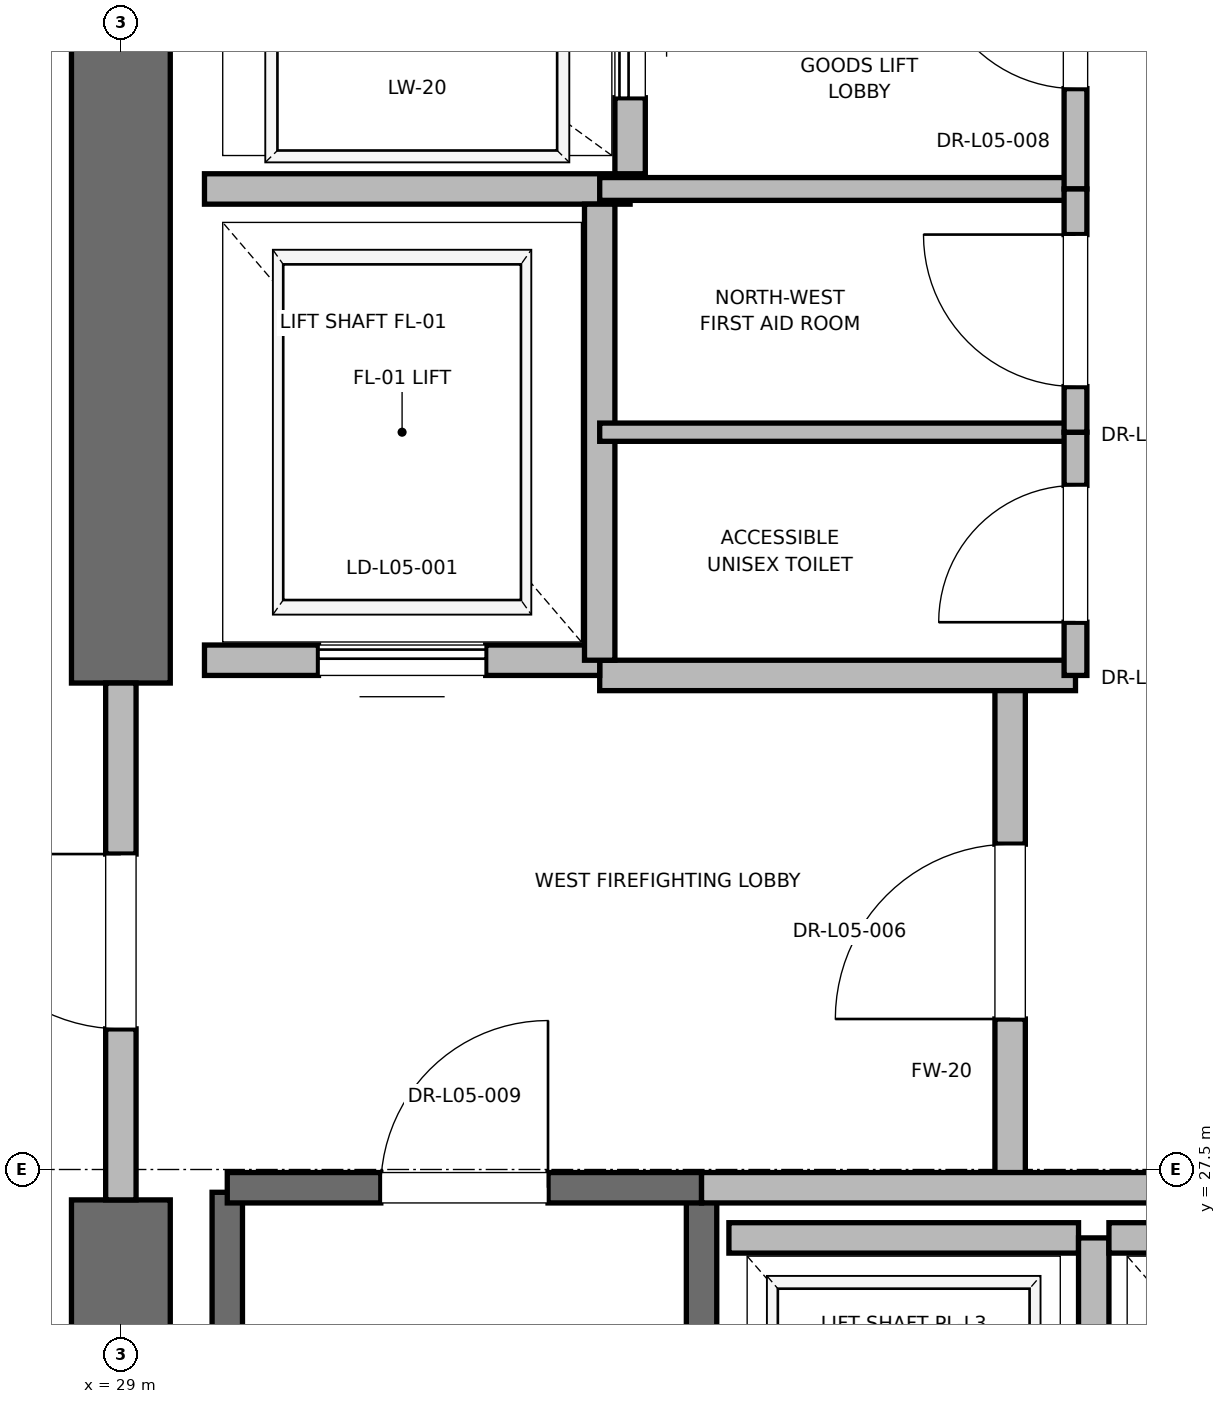
"""IFC4 building model, lengths in metres.
Left out: names, types, materials, properties, quantities, classifications, styles, units other than length and angle.
Written with IfcOpenShell. Run it as: python <this file> out.ifc"""

import sys

from ifc_helpers import new_model, si_unit, direction, frame, frame_2d, origin, place, context, subcontext, project, spatial, rectangle, extrude, element, fill, save


model = new_model("IFC4")
c1 = context("Model", 3, precision=1e-05, world=origin(), true_north=direction((0.0, 1.0)))
c2 = subcontext(c1, "Body", "Model", "MODEL_VIEW")
j1 = project(units=[si_unit("LENGTHUNIT", "METRE"), si_unit("PLANEANGLEUNIT", "RADIAN")], contexts=[c1])
p1 = place(None, origin())
s1 = spatial("IfcSite", under=j1, at=p1, CompositionType="ELEMENT")
p2 = place(p1, origin())
s2 = spatial("IfcBuilding", under=s1, at=p2, CompositionType="ELEMENT")
p3 = place(p2, frame((0.0, 0.0, 27.6)))
s3 = spatial("IfcBuildingStorey", under=s2, at=p3, CompositionType="ELEMENT", Elevation=27.6)
p4 = place(p3, frame((29.0, 18.5, 0.0), z_axis=(0.0, 0.0, 1.0), x_axis=(0.0, 1.0, 0.0)))
e1 = element("IfcWall", 1, at=p4, inside=s3, PredefinedType="SHEAR", context=c2, shape_type="SweptSolid", body=[
    extrude(rectangle(XDim=8.8, YDim=0.65, at=frame_2d((4.4, 0.0))), origin(), (0.0, 0.0, 1.0), 3.76),
])
p5 = place(p3, frame((29.0, 30.7, 0.0), z_axis=(0.0, 0.0, 1.0), x_axis=(0.0, 1.0, 0.0)))
e2 = element("IfcWall", 2, at=p5, inside=s3, PredefinedType="SHEAR", context=c2, shape_type="SweptSolid", body=[
    extrude(rectangle(XDim=5.8, YDim=0.65, at=frame_2d((2.9, 0.0))), origin(), (0.0, 0.0, 1.0), 3.76),
])
p6 = place(p3, frame((29.7, 19.2, 0.0), z_axis=(0.0, 0.0, 1.0), x_axis=(0.0, 1.0, 0.0)))
e3 = element("IfcWall", 3, at=p6, inside=s3, PredefinedType="SOLIDWALL", context=c2, shape_type="SweptSolid", body=[
    extrude(rectangle(XDim=8.15, YDim=0.2, at=frame_2d((4.075, 0.0))), origin(), (0.0, 0.0, 1.0), 3.76),
])
p7 = place(p3, frame((32.82, 18.6, 0.0), z_axis=(0.0, 0.0, 1.0), x_axis=(0.0, 1.0, 0.0)))
e4 = element("IfcWall", 4, at=p7, inside=s3, PredefinedType="SOLIDWALL", context=c2, shape_type="SweptSolid", body=[
    extrude(rectangle(XDim=8.78, YDim=0.2, at=frame_2d((4.39, 0.0))), origin(), (0.0, 0.0, 1.0), 3.76),
])
p8 = place(p3, frame((29.7, 27.38, 0.0), z_axis=(0.0, 0.0, 1.0), x_axis=(1.0, 0.0, 0.0)))
e5 = element("IfcWall", 5, at=p8, inside=s3, PredefinedType="SOLIDWALL", context=c2, shape_type="SweptSolid", body=[
    extrude(rectangle(XDim=3.12, YDim=0.2, at=frame_2d((1.56, 0.0))), origin(), (0.0, 0.0, 1.0), 3.76),
])
p9 = place(p8, frame((1.01, 0.0, 0.0)))
e6 = element("IfcOpeningElement", 6, at=p9, cuts=e5, PredefinedType="OPENING", context=c2, shape_type="SweptSolid", body=[
    extrude(rectangle(XDim=1.1, YDim=2.15, at=frame_2d((0.55, 1.075))), frame((0.0, 0.1, 0.0), z_axis=(0.0, -1.0, 0.0), x_axis=(1.0, 0.0, 0.0)), (0.0, 0.0, 1.0), 0.2),
])
p10 = place(p3, frame((34.85, 27.38, 0.0), z_axis=(0.0, 0.0, 1.0), x_axis=(0.0, 1.0, 0.0)))
e7 = element("IfcWall", 7, at=p10, inside=s3, PredefinedType="PARTITIONING", context=c2, shape_type="SweptSolid", body=[
    extrude(rectangle(XDim=3.37, YDim=0.2, at=frame_2d((1.685, 0.0))), origin(), (0.0, 0.0, 1.0), 3.76),
])
p11 = place(p10, frame((1.11, 0.0, 0.0)))
e8 = element("IfcOpeningElement", 8, at=p11, cuts=e7, PredefinedType="OPENING", context=c2, shape_type="SweptSolid", body=[
    extrude(rectangle(XDim=1.15, YDim=2.2, at=frame_2d((0.575, 1.1))), frame((0.0, 0.1, 0.0), z_axis=(0.0, -1.0, 0.0), x_axis=(1.0, 0.0, 0.0)), (0.0, 0.0, 1.0), 0.2),
])
p12 = place(p3, frame((29.0, 27.3, 0.0), z_axis=(0.0, 0.0, 1.0), x_axis=(0.0, 1.0, 0.0)))
e9 = element("IfcWall", 9, at=p12, inside=s3, PredefinedType="PARTITIONING", context=c2, shape_type="SweptSolid", body=[
    extrude(rectangle(XDim=3.4, YDim=0.2, at=frame_2d((1.7, 0.0))), origin(), (0.0, 0.0, 1.0), 2.54),
])
p13 = place(p12, frame((1.125, 0.0, 0.0)))
e10 = element("IfcOpeningElement", 10, at=p13, cuts=e9, PredefinedType="OPENING", context=c2, shape_type="SweptSolid", body=[
    extrude(rectangle(XDim=1.15, YDim=2.2, at=frame_2d((0.575, 1.1))), frame((0.0, 0.1, 0.0), z_axis=(0.0, -1.0, 0.0), x_axis=(1.0, 0.0, 0.0)), (0.0, 0.0, 1.0), 0.2),
])
p14 = place(p3, frame((32.82, 27.38, 0.0), z_axis=(0.0, 0.0, 1.0), x_axis=(1.0, 0.0, 0.0)))
e11 = element("IfcWall", 11, at=p14, inside=s3, PredefinedType="PARTITIONING", context=c2, shape_type="SweptSolid", body=[
    extrude(rectangle(XDim=5.62, YDim=0.2, at=frame_2d((2.81, 0.0))), origin(), (0.0, 0.0, 1.0), 3.76),
])
p15 = place(p3, frame((32.15, 30.75, 0.0), z_axis=(0.0, 0.0, 1.0), x_axis=(1.0, 0.0, 0.0)))
e12 = element("IfcWall", 12, at=p15, inside=s3, PredefinedType="PARTITIONING", context=c2, shape_type="SweptSolid", body=[
    extrude(rectangle(XDim=3.13, YDim=0.2, at=frame_2d((1.565, 0.0))), origin(), (0.0, 0.0, 1.0), 3.76),
])
p16 = place(p3, frame((29.55, 30.85, 0.0), z_axis=(0.0, 0.0, 1.0), x_axis=(1.0, 0.0, 0.0)))
e13 = element("IfcWall", 13, at=p16, inside=s3, PredefinedType="SOLIDWALL", context=c2, shape_type="SweptSolid", body=[
    extrude(rectangle(XDim=2.6, YDim=0.2, at=frame_2d((1.3, 0.0))), origin(), (0.0, 0.0, 1.0), 2.54),
])
p17 = place(p16, frame((0.75, 0.0, 0.0)))
e14 = element("IfcOpeningElement", 14, at=p17, cuts=e13, PredefinedType="OPENING", context=c2, shape_type="SweptSolid", body=[
    extrude(rectangle(XDim=1.1, YDim=2.2, at=frame_2d((0.55, 1.1))), frame((0.0, 0.1, 0.0), z_axis=(0.0, -1.0, 0.0), x_axis=(1.0, 0.0, 0.0)), (0.0, 0.0, 1.0), 0.2),
])
p18 = place(p3, frame((29.55, 33.95, 0.0), z_axis=(0.0, 0.0, 1.0), x_axis=(1.0, 0.0, 0.0)))
e15 = element("IfcWall", 15, at=p18, inside=s3, PredefinedType="SOLIDWALL", context=c2, shape_type="SweptSolid", body=[
    extrude(rectangle(XDim=2.8, YDim=0.2, at=frame_2d((1.4, 0.0))), origin(), (0.0, 0.0, 1.0), 3.76),
])
p19 = place(p3, frame((32.15, 30.85, 0.0), z_axis=(0.0, 0.0, 1.0), x_axis=(0.0, 1.0, 0.0)))
e16 = element("IfcWall", 16, at=p19, inside=s3, PredefinedType="SOLIDWALL", context=c2, shape_type="SweptSolid", body=[
    extrude(rectangle(XDim=3.0, YDim=0.2, at=frame_2d((1.5, 0.0))), origin(), (0.0, 0.0, 1.0), 3.76),
])
p20 = place(p3, frame((32.35, 34.05, 0.0), z_axis=(0.0, 0.0, 1.0), x_axis=(0.0, 1.0, 0.0)))
e17 = element("IfcWall", 17, at=p20, inside=s3, PredefinedType="SOLIDWALL", context=c2, shape_type="SweptSolid", body=[
    extrude(rectangle(XDim=2.1, YDim=0.2, at=frame_2d((1.05, 0.0))), origin(), (0.0, 0.0, 1.0), 3.76),
])
p21 = place(p20, frame((0.5, 0.0, 0.0)))
e18 = element("IfcOpeningElement", 18, at=p21, cuts=e17, PredefinedType="OPENING", context=c2, shape_type="SweptSolid", body=[
    extrude(rectangle(XDim=1.1, YDim=2.2, at=frame_2d((0.55, 1.1))), frame((0.0, 0.1, 0.0), z_axis=(0.0, -1.0, 0.0), x_axis=(1.0, 0.0, 0.0)), (0.0, 0.0, 1.0), 0.2),
])
p22 = place(p3, frame((35.3, 27.05, 0.0), z_axis=(0.0, 0.0, 1.0), x_axis=(-1.0, 0.0, 0.0)))
e19 = element("IfcWall", 19, at=p22, inside=s3, PredefinedType="SOLIDWALL", context=c2, shape_type="SweptSolid", body=[
    extrude(rectangle(XDim=2.3, YDim=0.2, at=frame_2d((1.15, 0.0))), origin(), (0.0, 0.0, 1.0), 3.76),
])
p23 = place(p3, frame((35.4, 24.45, 0.0), z_axis=(0.0, 0.0, 1.0), x_axis=(0.0, 1.0, 0.0)))
e20 = element("IfcWall", 20, at=p23, inside=s3, PredefinedType="SOLIDWALL", context=c2, shape_type="SweptSolid", body=[
    extrude(rectangle(XDim=2.6, YDim=0.2, at=frame_2d((1.3, 0.0))), origin(), (0.0, 0.0, 1.0), 3.76),
])
p24 = place(p3, frame((37.8, 27.05, 0.0), z_axis=(0.0, 0.0, 1.0), x_axis=(-1.0, 0.0, 0.0)))
e21 = element("IfcWall", 21, at=p24, inside=s3, PredefinedType="SOLIDWALL", context=c2, shape_type="SweptSolid", body=[
    extrude(rectangle(XDim=2.3, YDim=0.2, at=frame_2d((1.15, 0.0))), origin(), (0.0, 0.0, 1.0), 3.76),
])
p25 = place(p3, frame((32.15, 33.95, 0.0), z_axis=(0.0, 0.0, 1.0), x_axis=(1.0, 0.0, 0.0)))
e22 = element("IfcWall", 22, at=p25, inside=s3, PredefinedType="PARTITIONING", context=c2, shape_type="SweptSolid", body=[
    extrude(rectangle(XDim=3.13, YDim=0.15, at=frame_2d((1.565, 0.0))), origin(), (0.0, 0.0, 1.0), 2.85),
])
p26 = place(p3, frame((35.28, 33.95, 0.0), z_axis=(0.0, 0.0, 1.0), x_axis=(0.0, 1.0, 0.0)))
e23 = element("IfcWall", 23, at=p26, inside=s3, PredefinedType="PARTITIONING", context=c2, shape_type="SweptSolid", body=[
    extrude(rectangle(XDim=2.27, YDim=0.15, at=frame_2d((1.135, 0.0))), origin(), (0.0, 0.0, 1.0), 2.54),
])
p27 = place(p26, frame((0.66, 0.0, 0.0)))
e24 = element("IfcOpeningElement", 24, at=p27, cuts=e23, PredefinedType="OPENING", context=c2, shape_type="SweptSolid", body=[
    extrude(rectangle(XDim=0.95, YDim=2.15, at=frame_2d((0.475, 1.075))), frame((0.0, 0.075, 0.0), z_axis=(0.0, -1.0, 0.0), x_axis=(1.0, 0.0, 0.0)), (0.0, 0.0, 1.0), 0.15),
])
p28 = place(p3, frame((32.15, 32.35, 0.0), z_axis=(0.0, 0.0, 1.0), x_axis=(1.0, 0.0, 0.0)))
e25 = element("IfcWall", 25, at=p28, inside=s3, PredefinedType="PARTITIONING", context=c2, shape_type="SweptSolid", body=[
    extrude(rectangle(XDim=3.13, YDim=0.12, at=frame_2d((1.565, 0.0))), origin(), (0.0, 0.0, 1.0), 2.85),
])
p29 = place(p3, frame((35.28, 30.75, 0.0), z_axis=(0.0, 0.0, 1.0), x_axis=(0.0, 1.0, 0.0)))
e26 = element("IfcWall", 26, at=p29, inside=s3, PredefinedType="PARTITIONING", context=c2, shape_type="SweptSolid", body=[
    extrude(rectangle(XDim=1.6, YDim=0.15, at=frame_2d((0.8, 0.0))), origin(), (0.0, 0.0, 1.0), 2.85),
])
p30 = place(p29, frame((0.35, 0.0, 0.0)))
e27 = element("IfcOpeningElement", 27, at=p30, cuts=e26, PredefinedType="OPENING", context=c2, shape_type="SweptSolid", body=[
    extrude(rectangle(XDim=0.9, YDim=2.1, at=frame_2d((0.45, 1.05))), frame((0.0, 0.075, 0.0), z_axis=(0.0, -1.0, 0.0), x_axis=(1.0, 0.0, 0.0)), (0.0, 0.0, 1.0), 0.15),
])
p31 = place(p3, frame((35.28, 32.35, 0.0), z_axis=(0.0, 0.0, 1.0), x_axis=(0.0, 1.0, 0.0)))
e28 = element("IfcWall", 28, at=p31, inside=s3, PredefinedType="PARTITIONING", context=c2, shape_type="SweptSolid", body=[
    extrude(rectangle(XDim=1.6, YDim=0.15, at=frame_2d((0.8, 0.0))), origin(), (0.0, 0.0, 1.0), 2.85),
])
p32 = place(p31, frame((0.3, 0.0, 0.0)))
e29 = element("IfcOpeningElement", 29, at=p32, cuts=e28, PredefinedType="OPENING", context=c2, shape_type="SweptSolid", body=[
    extrude(rectangle(XDim=1.0, YDim=2.15, at=frame_2d((0.5, 1.075))), frame((0.0, 0.075, 0.0), z_axis=(0.0, -1.0, 0.0), x_axis=(1.0, 0.0, 0.0)), (0.0, 0.0, 1.0), 0.15),
])
p33 = place(p9, origin())
e30 = element("IfcDoor", 30, at=p33, inside=s3, OperationType="SINGLE_SWING_RIGHT", PredefinedType="DOOR", context=c2, shape_type="SweptSolid", body=[
    extrude(rectangle(XDim=1.1, YDim=2.15, at=frame_2d((0.55, 1.075))), frame((0.0, 0.025, 0.0), z_axis=(0.0, -1.0, 0.0), x_axis=(1.0, 0.0, 0.0)), (0.0, 0.0, 1.0), 0.05),
])
fill(e6, e30)
p34 = place(p11, origin())
e31 = element("IfcDoor", 31, at=p34, inside=s3, OperationType="SINGLE_SWING_LEFT", PredefinedType="DOOR", context=c2, shape_type="SweptSolid", body=[
    extrude(rectangle(XDim=1.15, YDim=2.2, at=frame_2d((0.575, 1.1))), frame((0.0, 0.025, 0.0), z_axis=(0.0, -1.0, 0.0), x_axis=(1.0, 0.0, 0.0)), (0.0, 0.0, 1.0), 0.05),
])
fill(e8, e31)
p35 = place(p13, origin())
e32 = element("IfcDoor", 32, at=p35, inside=s3, OperationType="SINGLE_SWING_RIGHT", PredefinedType="DOOR", context=c2, shape_type="SweptSolid", body=[
    extrude(rectangle(XDim=1.15, YDim=2.2, at=frame_2d((0.575, 1.1))), frame((0.0, 0.025, 0.0), z_axis=(0.0, -1.0, 0.0), x_axis=(1.0, 0.0, 0.0)), (0.0, 0.0, 1.0), 0.05),
])
fill(e10, e32)
p36 = place(p17, origin())
e33 = element("IfcDoor", 33, at=p36, inside=s3, OperationType="SLIDING_TO_RIGHT", PredefinedType="DOOR", context=c2, shape_type="SweptSolid", body=[
    extrude(rectangle(XDim=1.1, YDim=2.2, at=frame_2d((0.55, 1.1))), frame((0.0, 0.025, 0.0), z_axis=(0.0, -1.0, 0.0), x_axis=(1.0, 0.0, 0.0)), (0.0, 0.0, 1.0), 0.05),
])
fill(e14, e33)
p37 = place(p21, origin())
e34 = element("IfcDoor", 34, at=p37, inside=s3, OperationType="SLIDING_TO_RIGHT", PredefinedType="DOOR", context=c2, shape_type="SweptSolid", body=[
    extrude(rectangle(XDim=1.1, YDim=2.2, at=frame_2d((0.55, 1.1))), frame((0.0, 0.025, 0.0), z_axis=(0.0, -1.0, 0.0), x_axis=(1.0, 0.0, 0.0)), (0.0, 0.0, 1.0), 0.05),
])
fill(e18, e34)
p38 = place(p27, origin())
e35 = element("IfcDoor", 35, at=p38, inside=s3, OperationType="SINGLE_SWING_RIGHT", PredefinedType="DOOR", context=c2, shape_type="SweptSolid", body=[
    extrude(rectangle(XDim=0.95, YDim=2.15, at=frame_2d((0.475, 1.075))), frame((0.0, 0.025, 0.0), z_axis=(0.0, -1.0, 0.0), x_axis=(1.0, 0.0, 0.0)), (0.0, 0.0, 1.0), 0.05),
])
fill(e24, e35)
p39 = place(p30, origin())
e36 = element("IfcDoor", 36, at=p39, inside=s3, OperationType="SINGLE_SWING_LEFT", PredefinedType="DOOR", context=c2, shape_type="SweptSolid", body=[
    extrude(rectangle(XDim=0.9, YDim=2.1, at=frame_2d((0.45, 1.05))), frame((0.0, 0.025, 0.0), z_axis=(0.0, -1.0, 0.0), x_axis=(1.0, 0.0, 0.0)), (0.0, 0.0, 1.0), 0.05),
])
fill(e27, e36)
p40 = place(p32, origin())
e37 = element("IfcDoor", 37, at=p40, inside=s3, OperationType="SINGLE_SWING_RIGHT", PredefinedType="DOOR", context=c2, shape_type="SweptSolid", body=[
    extrude(rectangle(XDim=1.0, YDim=2.15, at=frame_2d((0.5, 1.075))), frame((0.0, 0.025, 0.0), z_axis=(0.0, -1.0, 0.0), x_axis=(1.0, 0.0, 0.0)), (0.0, 0.0, 1.0), 0.05),
])
fill(e29, e37)
save(model, sys.argv[1])
